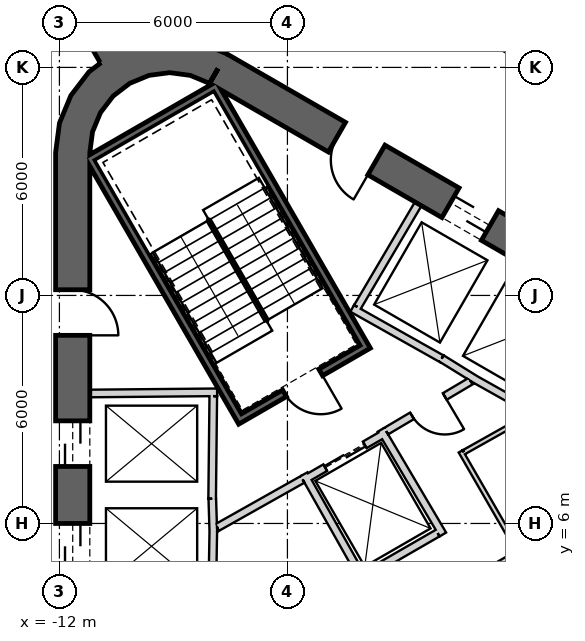
"""IFC4 building model, lengths in metres.
Left out: names, types, materials, properties, quantities, classifications, styles, units other than length and angle.
Written with IfcOpenShell. Run it as: python <this file> out.ifc"""

import sys

from ifc_helpers import new_model, si_unit, direction, frame, frame_2d, origin, place, context, subcontext, project, spatial, polyline, rectangle, outline, extrude, element, fill, save


model = new_model("IFC4")
c1 = context("Model", 3, precision=1e-05, world=origin(), true_north=direction((0.0, 1.0)))
c2 = subcontext(c1, "Body", "Model", "MODEL_VIEW")
j1 = project(units=[si_unit("LENGTHUNIT", "METRE"), si_unit("PLANEANGLEUNIT", "RADIAN")], contexts=[c1])
p1 = place(None, origin())
s1 = spatial("IfcSite", under=j1, at=p1, CompositionType="ELEMENT")
p2 = place(p1, origin())
s2 = spatial("IfcBuilding", under=s1, at=p2, CompositionType="ELEMENT")
p3 = place(p2, frame((0.0, 0.0, 131.6)))
s3 = spatial("IfcBuildingStorey", under=s2, at=p3, CompositionType="ELEMENT", Elevation=131.6)
p4 = place(p3, frame((19.475, 2.208, 0.0), z_axis=(0.0, 0.0, 1.0), x_axis=(-0.866028369851, 0.499994862586, 0.0)))
e1 = element("IfcWall", 1, at=p4, inside=s3, PredefinedType="SHEAR", context=c2, shape_type="SweptSolid", body=[
    extrude(rectangle(XDim=31.523, YDim=0.9, at=frame_2d((15.762, 0.0))), origin(), (0.0, 0.0, 1.0), 4.1),
])
p5 = place(p4, frame((7.062, 0.0, 0.0)))
e2 = element("IfcOpeningElement", 2, at=p5, cuts=e1, PredefinedType="OPENING", context=c2, shape_type="SweptSolid", body=[
    extrude(rectangle(XDim=1.2, YDim=2.4, at=frame_2d((0.6, 1.2))), frame((0.0, 0.46, 0.0), z_axis=(0.0, -1.0, 0.0), x_axis=(1.0, 0.0, 0.0)), (0.0, 0.0, 1.0), 0.92),
])
p6 = place(p4, frame((9.762, 0.0, 0.0)))
e3 = element("IfcOpeningElement", 3, at=p6, cuts=e1, PredefinedType="OPENING", context=c2, shape_type="SweptSolid", body=[
    extrude(rectangle(XDim=1.2, YDim=2.4, at=frame_2d((0.6, 1.2))), frame((0.0, 0.46, 0.0), z_axis=(0.0, -1.0, 0.0), x_axis=(1.0, 0.0, 0.0)), (0.0, 0.0, 1.0), 0.92),
])
p7 = place(p4, frame((12.462, 0.0, 0.0)))
e4 = element("IfcOpeningElement", 4, at=p7, cuts=e1, PredefinedType="OPENING", context=c2, shape_type="SweptSolid", body=[
    extrude(rectangle(XDim=1.2, YDim=2.4, at=frame_2d((0.6, 1.2))), frame((0.0, 0.46, 0.0), z_axis=(0.0, -1.0, 0.0), x_axis=(1.0, 0.0, 0.0)), (0.0, 0.0, 1.0), 0.92),
])
p8 = place(p4, frame((15.162, 0.0, 0.0)))
e5 = element("IfcOpeningElement", 5, at=p8, cuts=e1, PredefinedType="OPENING", context=c2, shape_type="SweptSolid", body=[
    extrude(rectangle(XDim=1.2, YDim=2.4, at=frame_2d((0.6, 1.2))), frame((0.0, 0.46, 0.0), z_axis=(0.0, -1.0, 0.0), x_axis=(1.0, 0.0, 0.0)), (0.0, 0.0, 1.0), 0.92),
])
p9 = place(p4, frame((17.862, 0.0, 0.0)))
e6 = element("IfcOpeningElement", 6, at=p9, cuts=e1, PredefinedType="OPENING", context=c2, shape_type="SweptSolid", body=[
    extrude(rectangle(XDim=1.2, YDim=2.4, at=frame_2d((0.6, 1.2))), frame((0.0, 0.46, 0.0), z_axis=(0.0, -1.0, 0.0), x_axis=(1.0, 0.0, 0.0)), (0.0, 0.0, 1.0), 0.92),
])
p10 = place(p4, frame((20.562, 0.0, 0.0)))
e7 = element("IfcOpeningElement", 7, at=p10, cuts=e1, PredefinedType="OPENING", context=c2, shape_type="SweptSolid", body=[
    extrude(rectangle(XDim=1.2, YDim=2.4, at=frame_2d((0.6, 1.2))), frame((0.0, 0.46, 0.0), z_axis=(0.0, -1.0, 0.0), x_axis=(1.0, 0.0, 0.0)), (0.0, 0.0, 1.0), 0.92),
])
p11 = place(p4, frame((23.262, 0.0, 0.0)))
e8 = element("IfcOpeningElement", 8, at=p11, cuts=e1, PredefinedType="OPENING", context=c2, shape_type="SweptSolid", body=[
    extrude(rectangle(XDim=1.2, YDim=2.4, at=frame_2d((0.6, 1.2))), frame((0.0, 0.46, 0.0), z_axis=(0.0, -1.0, 0.0), x_axis=(1.0, 0.0, 0.0)), (0.0, 0.0, 1.0), 0.92),
])
p12 = place(p4, frame((3.612, 0.0, 0.0)))
e9 = element("IfcOpeningElement", 9, at=p12, cuts=e1, PredefinedType="OPENING", context=c2, shape_type="SweptSolid", body=[
    extrude(rectangle(XDim=1.2, YDim=2.4, at=frame_2d((0.6, 1.2))), frame((0.0, 0.46, 0.0), z_axis=(0.0, -1.0, 0.0), x_axis=(1.0, 0.0, 0.0)), (0.0, 0.0, 1.0), 0.92),
])
p13 = place(p4, frame((26.712, 0.0, 0.0)))
e10 = element("IfcOpeningElement", 10, at=p13, cuts=e1, PredefinedType="OPENING", context=c2, shape_type="SweptSolid", body=[
    extrude(rectangle(XDim=1.2, YDim=2.4, at=frame_2d((0.6, 1.2))), frame((0.0, 0.46, 0.0), z_axis=(0.0, -1.0, 0.0), x_axis=(1.0, 0.0, 0.0)), (0.0, 0.0, 1.0), 0.92),
])
p14 = place(p3, frame((-11.65, 15.762, 0.0), z_axis=(0.0, 0.0, 1.0), x_axis=(0.0, -1.0, 0.0)))
e11 = element("IfcWall", 11, at=p14, inside=s3, PredefinedType="SHEAR", context=c2, shape_type="SweptSolid", body=[
    extrude(rectangle(XDim=31.523, YDim=0.9, at=frame_2d((15.762, 0.0))), origin(), (0.0, 0.0, 1.0), 4.1),
])
p15 = place(p14, frame((7.062, 0.0, 0.0)))
e12 = element("IfcOpeningElement", 12, at=p15, cuts=e11, PredefinedType="OPENING", context=c2, shape_type="SweptSolid", body=[
    extrude(rectangle(XDim=1.2, YDim=2.4, at=frame_2d((0.6, 1.2))), frame((0.0, 0.46, 0.0), z_axis=(0.0, -1.0, 0.0), x_axis=(1.0, 0.0, 0.0)), (0.0, 0.0, 1.0), 0.92),
])
p16 = place(p14, frame((9.762, 0.0, 0.0)))
e13 = element("IfcOpeningElement", 13, at=p16, cuts=e11, PredefinedType="OPENING", context=c2, shape_type="SweptSolid", body=[
    extrude(rectangle(XDim=1.2, YDim=2.4, at=frame_2d((0.6, 1.2))), frame((0.0, 0.46, 0.0), z_axis=(0.0, -1.0, 0.0), x_axis=(1.0, 0.0, 0.0)), (0.0, 0.0, 1.0), 0.92),
])
p17 = place(p14, frame((12.462, 0.0, 0.0)))
e14 = element("IfcOpeningElement", 14, at=p17, cuts=e11, PredefinedType="OPENING", context=c2, shape_type="SweptSolid", body=[
    extrude(rectangle(XDim=1.2, YDim=2.4, at=frame_2d((0.6, 1.2))), frame((0.0, 0.46, 0.0), z_axis=(0.0, -1.0, 0.0), x_axis=(1.0, 0.0, 0.0)), (0.0, 0.0, 1.0), 0.92),
])
p18 = place(p14, frame((15.162, 0.0, 0.0)))
e15 = element("IfcOpeningElement", 15, at=p18, cuts=e11, PredefinedType="OPENING", context=c2, shape_type="SweptSolid", body=[
    extrude(rectangle(XDim=1.2, YDim=2.4, at=frame_2d((0.6, 1.2))), frame((0.0, 0.46, 0.0), z_axis=(0.0, -1.0, 0.0), x_axis=(1.0, 0.0, 0.0)), (0.0, 0.0, 1.0), 0.92),
])
p19 = place(p14, frame((17.862, 0.0, 0.0)))
e16 = element("IfcOpeningElement", 16, at=p19, cuts=e11, PredefinedType="OPENING", context=c2, shape_type="SweptSolid", body=[
    extrude(rectangle(XDim=1.2, YDim=2.4, at=frame_2d((0.6, 1.2))), frame((0.0, 0.46, 0.0), z_axis=(0.0, -1.0, 0.0), x_axis=(1.0, 0.0, 0.0)), (0.0, 0.0, 1.0), 0.92),
])
p20 = place(p14, frame((20.562, 0.0, 0.0)))
e17 = element("IfcOpeningElement", 17, at=p20, cuts=e11, PredefinedType="OPENING", context=c2, shape_type="SweptSolid", body=[
    extrude(rectangle(XDim=1.2, YDim=2.4, at=frame_2d((0.6, 1.2))), frame((0.0, 0.46, 0.0), z_axis=(0.0, -1.0, 0.0), x_axis=(1.0, 0.0, 0.0)), (0.0, 0.0, 1.0), 0.92),
])
p21 = place(p14, frame((23.262, 0.0, 0.0)))
e18 = element("IfcOpeningElement", 18, at=p21, cuts=e11, PredefinedType="OPENING", context=c2, shape_type="SweptSolid", body=[
    extrude(rectangle(XDim=1.2, YDim=2.4, at=frame_2d((0.6, 1.2))), frame((0.0, 0.46, 0.0), z_axis=(0.0, -1.0, 0.0), x_axis=(1.0, 0.0, 0.0)), (0.0, 0.0, 1.0), 0.92),
])
p22 = place(p14, frame((3.612, 0.0, 0.0)))
e19 = element("IfcOpeningElement", 19, at=p22, cuts=e11, PredefinedType="OPENING", context=c2, shape_type="SweptSolid", body=[
    extrude(rectangle(XDim=1.2, YDim=2.4, at=frame_2d((0.6, 1.2))), frame((0.0, 0.46, 0.0), z_axis=(0.0, -1.0, 0.0), x_axis=(1.0, 0.0, 0.0)), (0.0, 0.0, 1.0), 0.92),
])
p23 = place(p14, frame((26.712, 0.0, 0.0)))
e20 = element("IfcOpeningElement", 20, at=p23, cuts=e11, PredefinedType="OPENING", context=c2, shape_type="SweptSolid", body=[
    extrude(rectangle(XDim=1.2, YDim=2.4, at=frame_2d((0.6, 1.2))), frame((0.0, 0.46, 0.0), z_axis=(0.0, -1.0, 0.0), x_axis=(1.0, 0.0, 0.0)), (0.0, 0.0, 1.0), 0.92),
])
p24 = place(p3, origin())
e21 = element("IfcWall", 21, at=p24, inside=s3, PredefinedType="SHEAR", context=c2, shape_type="SweptSolid", body=[
    extrude(outline(polyline([(-7.6, 18.36), (-8.323, 18.659), (-9.1, 18.762), (-9.876, 18.659), (-10.6, 18.36), (-11.221, 17.883), (-11.698, 17.262), (-11.998, 16.538), (-12.1, 15.762), (-11.2, 15.762), (-11.128, 16.305), (-10.919, 16.812), (-10.585, 17.247), (-10.15, 17.58), (-9.644, 17.79), (-9.1, 17.862), (-8.556, 17.79), (-8.05, 17.58), (-7.6, 18.36)])), origin(), (0.0, 0.0, 1.0), 4.1),
])
p25 = place(p3, frame((-10.575, 18.316, 0.0), z_axis=(0.0, 0.0, 1.0), x_axis=(-0.500005394759, 0.866022289097, 0.0)))
e22 = element("IfcWall", 22, at=p25, inside=s3, PredefinedType="SHEAR", context=c2, shape_type="SweptSolid", body=[
    extrude(rectangle(XDim=12.598, YDim=0.8, at=frame_2d((6.299, 0.0))), origin(), (0.0, 0.0, 1.0), 4.1),
])
p26 = place(p25, frame((1.3, 0.0, 0.0)))
e23 = element("IfcOpeningElement", 23, at=p26, cuts=e22, PredefinedType="OPENING", context=c2, shape_type="SweptSolid", body=[
    extrude(rectangle(XDim=1.4, YDim=2.4, at=frame_2d((0.7, 1.2))), frame((0.0, 0.41, 0.0), z_axis=(0.0, -1.0, 0.0), x_axis=(1.0, 0.0, 0.0)), (0.0, 0.0, 1.0), 0.82),
])
p27 = place(p3, frame((-11.2, 9.42, 0.0), z_axis=(0.0, 0.0, 1.0), x_axis=(0.999957167047, 0.009255488683, 0.0)))
e24 = element("IfcWall", 24, at=p27, inside=s3, PredefinedType="PLUMBINGWALL", context=c2, shape_type="SweptSolid", body=[
    extrude(rectangle(XDim=3.35, YDim=0.2, at=frame_2d((1.675, 0.0))), origin(), (0.0, 0.0, 1.0), 3.8),
])
p28 = place(p3, frame((-7.951, 9.35, 0.0), z_axis=(0.0, 0.0, 1.0), x_axis=(-0.011120469654, -0.999938165666, 0.0)))
e25 = element("IfcWall", 25, at=p28, inside=s3, PredefinedType="PLUMBINGWALL", context=c2, shape_type="SweptSolid", body=[
    extrude(rectangle(XDim=2.7, YDim=0.2, at=frame_2d((1.35, 0.0))), origin(), (0.0, 0.0, 1.0), 3.8),
])
p29 = place(p3, frame((-7.977, 6.65, 0.0), z_axis=(0.0, 0.0, 1.0), x_axis=(0.030861509705, -0.999523670164, 0.0)))
e26 = element("IfcWall", 26, at=p29, inside=s3, PredefinedType="PLUMBINGWALL", context=c2, shape_type="SweptSolid", body=[
    extrude(rectangle(XDim=0.878, YDim=0.2, at=frame_2d((0.439, 0.0))), origin(), (0.0, 0.0, 1.0), 3.8),
])
p30 = place(p3, frame((-7.949, 5.894, 0.0), z_axis=(0.0, 0.0, 1.0), x_axis=(-0.016809909365, -0.999858703491, 0.0)))
e27 = element("IfcWall", 27, at=p30, inside=s3, PredefinedType="PLUMBINGWALL", context=c2, shape_type="SweptSolid", body=[
    extrude(rectangle(XDim=1.844, YDim=0.2, at=frame_2d((0.922, 0.0))), origin(), (0.0, 0.0, 1.0), 3.8),
])
p31 = place(p3, frame((-1.941, 10.339, 0.0), z_axis=(0.0, 0.0, 1.0), x_axis=(0.850216889117, -0.526432561171, 0.0)))
e28 = element("IfcWall", 28, at=p31, inside=s3, PredefinedType="PLUMBINGWALL", context=c2, shape_type="SweptSolid", body=[
    extrude(rectangle(XDim=1.078, YDim=0.2, at=frame_2d((0.539, 0.0))), origin(), (0.0, 0.0, 1.0), 3.8),
])
p32 = place(p3, frame((0.478, 8.928, 0.0), z_axis=(0.0, 0.0, 1.0), x_axis=(-0.871988740738, 0.489525929882, 0.0)))
e29 = element("IfcWall", 29, at=p32, inside=s3, PredefinedType="PLUMBINGWALL", context=c2, shape_type="SweptSolid", body=[
    extrude(rectangle(XDim=1.845, YDim=0.2, at=frame_2d((0.922, 0.0))), origin(), (0.0, 0.0, 1.0), 3.8),
])
p33 = place(p3, frame((-4.296, 11.659, 0.0), z_axis=(0.0, 0.0, 1.0), x_axis=(0.871534483978, -0.490334215854, 0.0)))
e30 = element("IfcWall", 30, at=p33, inside=s3, PredefinedType="PLUMBINGWALL", context=c2, shape_type="SweptSolid", body=[
    extrude(rectangle(XDim=2.7, YDim=0.2, at=frame_2d((1.35, 0.0))), origin(), (0.0, 0.0, 1.0), 3.8),
])
p34 = place(p3, frame((-4.158, 11.696, 0.0), z_axis=(0.0, 0.0, 1.0), x_axis=(0.508018930956, 0.861345903683, 0.0)))
e31 = element("IfcWall", 31, at=p34, inside=s3, PredefinedType="PLUMBINGWALL", context=c2, shape_type="SweptSolid", body=[
    extrude(rectangle(XDim=3.15, YDim=0.2, at=frame_2d((1.575, 0.0))), origin(), (0.0, 0.0, 1.0), 3.8),
])
p35 = place(p3, frame((-11.245, 15.678, -0.3), z_axis=(0.0, 0.0, 1.0), x_axis=(0.499977274689, -0.866038523851, 0.0)))
e32 = element("IfcWall", 32, at=p35, inside=s3, PredefinedType="SHEAR", context=c2, shape_type="SweptSolid", body=[
    extrude(rectangle(XDim=8.1, YDim=0.2, at=frame_2d((4.05, 0.0))), origin(), (0.0, 0.0, 1.0), 4.1),
])
p36 = place(p3, frame((-7.818, 17.541, -0.3), z_axis=(0.0, 0.0, 1.0), x_axis=(-0.866044365799, -0.499967155389, 0.0)))
e33 = element("IfcWall", 33, at=p36, inside=s3, PredefinedType="SHEAR", context=c2, shape_type="SweptSolid", body=[
    extrude(rectangle(XDim=3.8, YDim=0.2, at=frame_2d((1.9, 0.0))), origin(), (0.0, 0.0, 1.0), 4.1),
])
p37 = place(p3, frame((-7.854, 17.405, -0.3), z_axis=(0.0, 0.0, 1.0), x_axis=(0.499997992926, -0.866026562566, 0.0)))
e34 = element("IfcWall", 34, at=p37, inside=s3, PredefinedType="SHEAR", context=c2, shape_type="SweptSolid", body=[
    extrude(rectangle(XDim=7.9, YDim=0.2, at=frame_2d((3.95, 0.0))), origin(), (0.0, 0.0, 1.0), 4.1),
])
p38 = place(p3, frame((-7.159, 8.8, -0.3), z_axis=(0.0, 0.0, 1.0), x_axis=(0.866047807691, 0.499961193289, 0.0)))
e35 = element("IfcWall", 35, at=p38, inside=s3, PredefinedType="SHEAR", context=c2, shape_type="SweptSolid", body=[
    extrude(rectangle(XDim=3.6, YDim=0.2, at=frame_2d((1.8, 0.0))), origin(), (0.0, 0.0, 1.0), 4.1),
])
p39 = place(p38, frame((1.25, 0.0, 0.3)))
e36 = element("IfcOpeningElement", 36, at=p39, cuts=e35, PredefinedType="OPENING", context=c2, shape_type="SweptSolid", body=[
    extrude(rectangle(XDim=1.1, YDim=2.1, at=frame_2d((0.55, 1.05))), frame((0.0, 0.11, 0.0), z_axis=(0.0, -1.0, 0.0), x_axis=(1.0, 0.0, 0.0)), (0.0, 0.0, 1.0), 0.22),
])
p40 = place(p3, frame((-5.524, 7.168, 0.0), z_axis=(0.0, 0.0, 1.0), x_axis=(0.866024647952, 0.500001309137, 0.0)))
e37 = element("IfcWall", 37, at=p40, inside=s3, PredefinedType="PLUMBINGWALL", context=c2, shape_type="SweptSolid", body=[
    extrude(rectangle(XDim=2.4, YDim=0.2, at=frame_2d((1.2, 0.0))), origin(), (0.0, 0.0, 1.0), 3.8),
])
p41 = place(p40, frame((0.6, 0.0, 0.0)))
e38 = element("IfcOpeningElement", 38, at=p41, cuts=e37, PredefinedType="OPENING", context=c2, shape_type="SweptSolid", body=[
    extrude(rectangle(XDim=1.2, YDim=2.4, at=frame_2d((0.6, 1.2))), frame((0.0, 0.11, 0.0), z_axis=(0.0, -1.0, 0.0), x_axis=(1.0, 0.0, 0.0)), (0.0, 0.0, 1.0), 0.22),
])
p42 = place(p3, frame((-4.039, 4.596, 0.0), z_axis=(0.0, 0.0, 1.0), x_axis=(-0.491322718731, 0.870977603649, 0.0)))
e39 = element("IfcWall", 39, at=p42, inside=s3, PredefinedType="PLUMBINGWALL", context=c2, shape_type="SweptSolid", body=[
    extrude(rectangle(XDim=3.1, YDim=0.2, at=frame_2d((1.55, 0.0))), origin(), (0.0, 0.0, 1.0), 3.8),
])
p43 = place(p3, frame((-3.538, 8.465, 0.0), z_axis=(0.0, 0.0, 1.0), x_axis=(0.508616218331, -0.860993346345, 0.0)))
e40 = element("IfcWall", 40, at=p43, inside=s3, PredefinedType="PLUMBINGWALL", context=c2, shape_type="SweptSolid", body=[
    extrude(rectangle(XDim=3.2, YDim=0.2, at=frame_2d((1.6, 0.0))), origin(), (0.0, 0.0, 1.0), 3.8),
])
p44 = place(p3, frame((-2.047, 5.746, 0.0), z_axis=(0.0, 0.0, 1.0), x_axis=(-0.866019606374, -0.500010041276, 0.0)))
e41 = element("IfcWall", 41, at=p44, inside=s3, PredefinedType="PLUMBINGWALL", context=c2, shape_type="SweptSolid", body=[
    extrude(rectangle(XDim=2.205, YDim=0.2, at=frame_2d((1.102, 0.0))), origin(), (0.0, 0.0, 1.0), 3.8),
])
p45 = place(p3, frame((-5.6, 7.16, 0.0), z_axis=(0.0, 0.0, 1.0), x_axis=(-0.871340486379, -0.490678873396, 0.0)))
e42 = element("IfcWall", 42, at=p45, inside=s3, PredefinedType="PARTITIONING", context=c2, shape_type="SweptSolid", body=[
    extrude(rectangle(XDim=2.581, YDim=0.2, at=frame_2d((1.291, 0.0))), origin(), (0.0, 0.0, 1.0), 3.8),
])
p46 = place(p3, frame((-1.179, 9.745, 0.0), z_axis=(0.0, 0.0, 1.0), x_axis=(-0.860598681535, -0.509283721849, 0.0)))
e43 = element("IfcWall", 43, at=p46, inside=s3, PredefinedType="PARTITIONING", context=c2, shape_type="SweptSolid", body=[
    extrude(rectangle(XDim=2.581, YDim=0.2, at=frame_2d((1.291, 0.0))), origin(), (0.0, 0.0, 1.0), 3.8),
])
p47 = place(p46, frame((0.791, 0.0, 0.0)))
e44 = element("IfcOpeningElement", 44, at=p47, cuts=e43, PredefinedType="OPENING", context=c2, shape_type="SweptSolid", body=[
    extrude(rectangle(XDim=1.0, YDim=2.1, at=frame_2d((0.5, 1.05))), frame((0.0, 0.11, 0.0), z_axis=(0.0, -1.0, 0.0), x_axis=(1.0, 0.0, 0.0)), (0.0, 0.0, 1.0), 0.22),
])
p48 = place(p3, frame((0.14, 5.277, 0.0), z_axis=(0.0, 0.0, 1.0), x_axis=(-0.865989465428, -0.500062241894, 0.0)))
e45 = element("IfcWall", 45, at=p48, inside=s3, PredefinedType="PARTITIONING", context=c2, shape_type="SweptSolid", body=[
    extrude(rectangle(XDim=1.7, YDim=0.12, at=frame_2d((0.85, 0.0))), origin(), (0.0, 0.0, 1.0), 3.8),
])
p49 = place(p3, frame((-1.442, 7.897, 0.0), z_axis=(0.0, 0.0, 1.0), x_axis=(0.499990139034, -0.866031096941, 0.0)))
e46 = element("IfcWall", 46, at=p49, inside=s3, PredefinedType="PARTITIONING", context=c2, shape_type="SweptSolid", body=[
    extrude(rectangle(XDim=3.0, YDim=0.12, at=frame_2d((1.5, 0.0))), origin(), (0.0, 0.0, 1.0), 3.8),
])
p50 = place(p3, frame((0.475, 8.905, 0.0), z_axis=(0.0, 0.0, 1.0), x_axis=(-0.871832572129, -0.489804007921, 0.0)))
e47 = element("IfcWall", 47, at=p50, inside=s3, PredefinedType="PARTITIONING", context=c2, shape_type="SweptSolid", body=[
    extrude(rectangle(XDim=2.104, YDim=0.12, at=frame_2d((1.052, 0.0))), origin(), (0.0, 0.0, 1.0), 3.8),
])
p51 = place(p3, frame((22.336, 5.464, 0.0), z_axis=(0.0, 0.0, 1.0), x_axis=(-0.866027503332, 0.499996363459, 0.0)))
e48 = element("IfcWall", 48, at=p51, inside=s3, PredefinedType="PARTITIONING", context=c2, shape_type="SweptSolid", body=[
    extrude(rectangle(XDim=33.022, YDim=0.2, at=frame_2d((16.511, 0.0))), origin(), (0.0, 0.0, 1.0), 2.98),
])
p52 = place(p51, frame((16.061, 0.0, 0.0)))
e49 = element("IfcOpeningElement", 49, at=p52, cuts=e48, PredefinedType="OPENING", context=c2, shape_type="SweptSolid", body=[
    extrude(rectangle(XDim=1.0, YDim=2.1, at=frame_2d((0.5, 1.05))), frame((0.0, 0.11, 0.0), z_axis=(0.0, -1.0, 0.0), x_axis=(1.0, 0.0, 0.0)), (0.0, 0.0, 1.0), 0.22),
])
p53 = place(p39, origin())
e50 = element("IfcDoor", 50, at=p53, inside=s3, OperationType="SINGLE_SWING_LEFT", PredefinedType="USERDEFINED", context=c2, shape_type="SweptSolid", body=[
    extrude(rectangle(XDim=1.1, YDim=2.1, at=frame_2d((0.55, 1.05))), frame((0.0, 0.025, 0.0), z_axis=(0.0, -1.0, 0.0), x_axis=(1.0, 0.0, 0.0)), (0.0, 0.0, 1.0), 0.05),
])
fill(e36, e50)
p54 = place(p47, origin())
e51 = element("IfcDoor", 51, at=p54, inside=s3, OperationType="SINGLE_SWING_RIGHT", PredefinedType="USERDEFINED", context=c2, shape_type="SweptSolid", body=[
    extrude(rectangle(XDim=1.0, YDim=2.1, at=frame_2d((0.5, 1.05))), frame((0.0, 0.025, 0.0), z_axis=(0.0, -1.0, 0.0), x_axis=(1.0, 0.0, 0.0)), (0.0, 0.0, 1.0), 0.05),
])
fill(e44, e51)
p55 = place(p41, origin())
e52 = element("IfcDoor", 52, at=p55, inside=s3, OperationType="SLIDING_TO_LEFT", PredefinedType="USERDEFINED", context=c2, shape_type="SweptSolid", body=[
    extrude(rectangle(XDim=1.2, YDim=2.4, at=frame_2d((0.6, 1.2))), frame((0.0, 0.025, 0.0), z_axis=(0.0, -1.0, 0.0), x_axis=(1.0, 0.0, 0.0)), (0.0, 0.0, 1.0), 0.05),
])
fill(e38, e52)
p56 = place(p15, origin())
e53 = element("IfcDoor", 53, at=p56, inside=s3, OperationType="SLIDING_TO_LEFT", PredefinedType="USERDEFINED", context=c2, shape_type="SweptSolid", body=[
    extrude(rectangle(XDim=1.2, YDim=2.4, at=frame_2d((0.6, 1.2))), frame((0.0, 0.025, 0.0), z_axis=(0.0, -1.0, 0.0), x_axis=(1.0, 0.0, 0.0)), (0.0, 0.0, 1.0), 0.05),
])
fill(e12, e53)
p57 = place(p16, origin())
e54 = element("IfcDoor", 54, at=p57, inside=s3, OperationType="SLIDING_TO_LEFT", PredefinedType="USERDEFINED", context=c2, shape_type="SweptSolid", body=[
    extrude(rectangle(XDim=1.2, YDim=2.4, at=frame_2d((0.6, 1.2))), frame((0.0, 0.025, 0.0), z_axis=(0.0, -1.0, 0.0), x_axis=(1.0, 0.0, 0.0)), (0.0, 0.0, 1.0), 0.05),
])
fill(e13, e54)
p58 = place(p11, origin())
e55 = element("IfcDoor", 55, at=p58, inside=s3, OperationType="SLIDING_TO_LEFT", PredefinedType="USERDEFINED", context=c2, shape_type="SweptSolid", body=[
    extrude(rectangle(XDim=1.2, YDim=2.4, at=frame_2d((0.6, 1.2))), frame((0.0, 0.025, 0.0), z_axis=(0.0, -1.0, 0.0), x_axis=(1.0, 0.0, 0.0)), (0.0, 0.0, 1.0), 0.05),
])
fill(e8, e55)
p59 = place(p13, origin())
e56 = element("IfcDoor", 56, at=p59, inside=s3, OperationType="SINGLE_SWING_LEFT", PredefinedType="USERDEFINED", context=c2, shape_type="SweptSolid", body=[
    extrude(rectangle(XDim=1.2, YDim=2.4, at=frame_2d((0.6, 1.2))), frame((0.0, 0.025, 0.0), z_axis=(0.0, -1.0, 0.0), x_axis=(1.0, 0.0, 0.0)), (0.0, 0.0, 1.0), 0.05),
])
fill(e10, e56)
p60 = place(p22, origin())
e57 = element("IfcDoor", 57, at=p60, inside=s3, OperationType="SINGLE_SWING_LEFT", PredefinedType="USERDEFINED", context=c2, shape_type="SweptSolid", body=[
    extrude(rectangle(XDim=1.2, YDim=2.4, at=frame_2d((0.6, 1.2))), frame((0.0, 0.025, 0.0), z_axis=(0.0, -1.0, 0.0), x_axis=(1.0, 0.0, 0.0)), (0.0, 0.0, 1.0), 0.05),
])
fill(e19, e57)
save(model, sys.argv[1])
